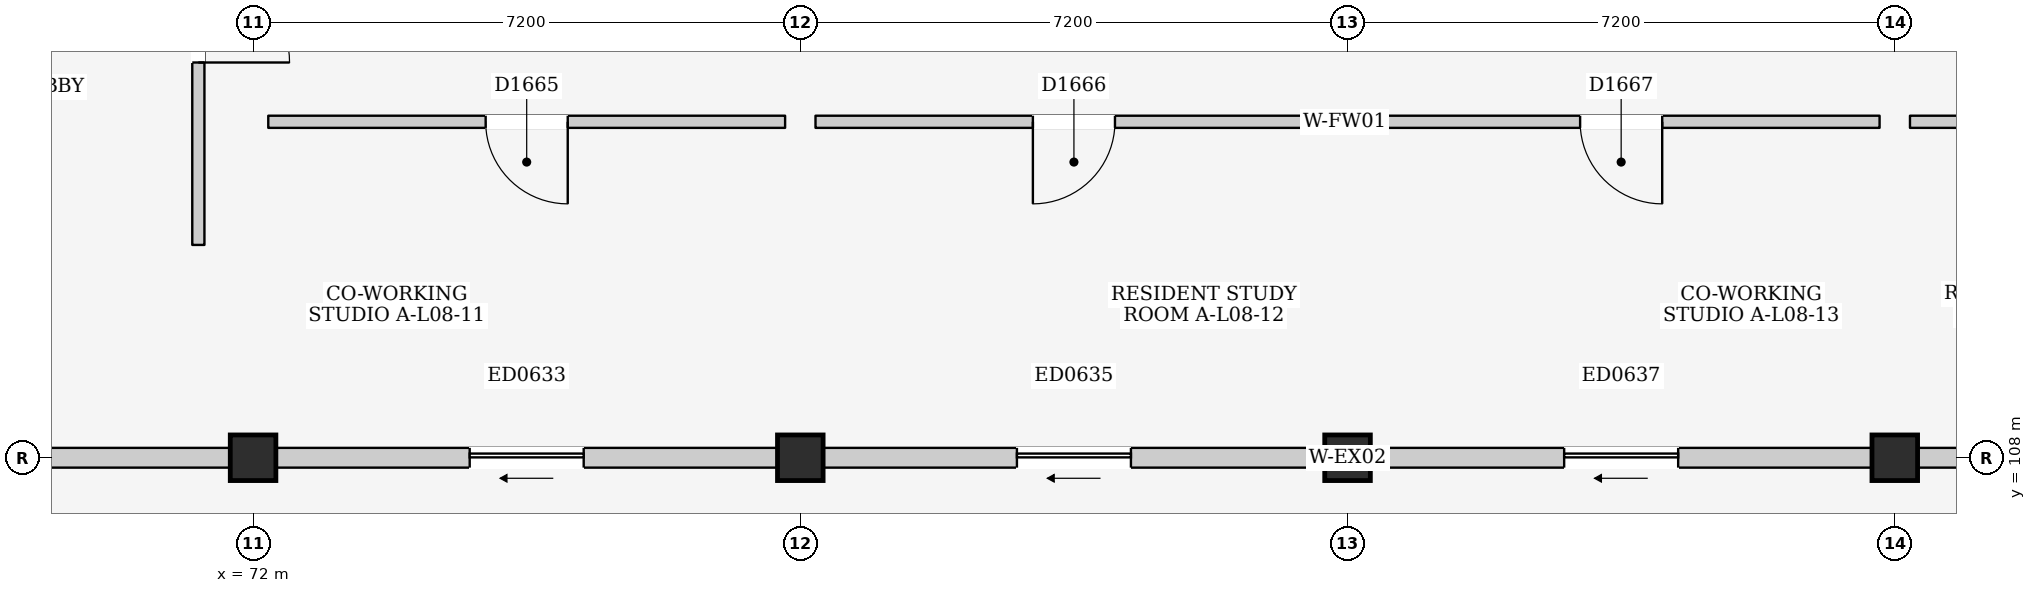
"""IFC4 building model, lengths in metres.
Left out: names, types, materials, properties, quantities, classifications, styles, units other than length and angle.
Written with IfcOpenShell. Run it as: python <this file> out.ifc"""

import sys

from ifc_helpers import new_model, si_unit, direction, frame, frame_2d, origin, origin_2d, place, context, subcontext, project, spatial, rectangle, extrude, element, fill, save


model = new_model("IFC4")
c1 = context("Model", 3, precision=1e-05, world=origin(), true_north=direction((0.0, 1.0)))
c2 = subcontext(c1, "Body", "Model", "MODEL_VIEW")
j1 = project(units=[si_unit("LENGTHUNIT", "METRE"), si_unit("PLANEANGLEUNIT", "RADIAN")], contexts=[c1])
p1 = place(None, origin())
s1 = spatial("IfcSite", under=j1, at=p1, CompositionType="ELEMENT")
p2 = place(p1, origin())
s2 = spatial("IfcBuilding", under=s1, at=p2, CompositionType="ELEMENT")
p3 = place(p2, frame((0.0, 0.0, 28.3)))
s3 = spatial("IfcBuildingStorey", under=s2, at=p3, CompositionType="ELEMENT", Elevation=28.3)
for number, where, z_axis, x_axis in (
    (1, (72.0, 108.0, 0.0), (0.0, 0.0, 1.0), (1.0, 0.0, 0.0)),
    (2, (79.2, 108.0, 0.0), (0.0, 0.0, 1.0), (1.0, 0.0, 0.0)),
    (3, (86.4, 108.0, 0.0), (0.0, 0.0, 1.0), (1.0, 0.0, 0.0)),
    (4, (93.6, 108.0, 0.0), (0.0, 0.0, 1.0), (1.0, 0.0, 0.0)),
):
    element("IfcColumn", number, at=place(p3, frame(where, z_axis=z_axis, x_axis=x_axis)), inside=s3, PredefinedType="COLUMN", context=c2, shape_type="SweptSolid", body=[
        extrude(rectangle(XDim=0.6, YDim=0.6, at=origin_2d()), origin(), (0.0, 0.0, 1.0), 3.2),
    ])
p4 = place(p3, frame((65.1, 108.0, 0.0), z_axis=(0.0, 0.0, 1.0), x_axis=(1.0, 0.0, 0.0)))
e5 = element("IfcWall", 5, at=p4, inside=s3, PredefinedType="ELEMENTEDWALL", context=c2, shape_type="SweptSolid", body=[
    extrude(rectangle(XDim=6.6, YDim=0.26, at=frame_2d((3.3, 0.0))), origin(), (0.0, 0.0, 1.0), 2.285),
])
p5 = place(p4, frame((2.8, 0.0, 1.2)))
e6 = element("IfcOpeningElement", 6, at=p5, cuts=e5, PredefinedType="OPENING", context=c2, shape_type="SweptSolid", body=[
    extrude(rectangle(XDim=1.0, YDim=0.9, at=frame_2d((0.5, 0.45))), frame((0.0, 0.145, 0.0), z_axis=(0.0, -1.0, 0.0), x_axis=(1.0, 0.0, 0.0)), (0.0, 0.0, 1.0), 0.29),
])
p6 = place(p3, frame((72.3, 108.0, 0.0), z_axis=(0.0, 0.0, 1.0), x_axis=(1.0, 0.0, 0.0)))
e7 = element("IfcWall", 7, at=p6, inside=s3, PredefinedType="ELEMENTEDWALL", context=c2, shape_type="SweptSolid", body=[
    extrude(rectangle(XDim=6.6, YDim=0.26, at=frame_2d((3.3, 0.0))), origin(), (0.0, 0.0, 1.0), 2.285),
])
p7 = place(p6, frame((2.55, 0.0, 0.0)))
e8 = element("IfcOpeningElement", 8, at=p7, cuts=e7, PredefinedType="OPENING", context=c2, shape_type="SweptSolid", body=[
    extrude(rectangle(XDim=1.5, YDim=2.12, at=frame_2d((0.75, 1.06))), frame((0.0, 0.145, 0.0), z_axis=(0.0, -1.0, 0.0), x_axis=(1.0, 0.0, 0.0)), (0.0, 0.0, 1.0), 0.29),
])
p8 = place(p3, frame((79.5, 108.0, 0.0), z_axis=(0.0, 0.0, 1.0), x_axis=(1.0, 0.0, 0.0)))
e9 = element("IfcWall", 9, at=p8, inside=s3, PredefinedType="ELEMENTEDWALL", context=c2, shape_type="SweptSolid", body=[
    extrude(rectangle(XDim=6.6, YDim=0.26, at=frame_2d((3.3, 0.0))), origin(), (0.0, 0.0, 1.0), 2.285),
])
p9 = place(p8, frame((2.55, 0.0, 0.0)))
e10 = element("IfcOpeningElement", 10, at=p9, cuts=e9, PredefinedType="OPENING", context=c2, shape_type="SweptSolid", body=[
    extrude(rectangle(XDim=1.5, YDim=2.12, at=frame_2d((0.75, 1.06))), frame((0.0, 0.145, 0.0), z_axis=(0.0, -1.0, 0.0), x_axis=(1.0, 0.0, 0.0)), (0.0, 0.0, 1.0), 0.29),
])
p10 = place(p3, frame((86.7, 108.0, 0.0), z_axis=(0.0, 0.0, 1.0), x_axis=(1.0, 0.0, 0.0)))
e11 = element("IfcWall", 11, at=p10, inside=s3, PredefinedType="ELEMENTEDWALL", context=c2, shape_type="SweptSolid", body=[
    extrude(rectangle(XDim=6.6, YDim=0.26, at=frame_2d((3.3, 0.0))), origin(), (0.0, 0.0, 1.0), 2.285),
])
p11 = place(p10, frame((2.55, 0.0, 0.0)))
e12 = element("IfcOpeningElement", 12, at=p11, cuts=e11, PredefinedType="OPENING", context=c2, shape_type="SweptSolid", body=[
    extrude(rectangle(XDim=1.5, YDim=2.12, at=frame_2d((0.75, 1.06))), frame((0.0, 0.145, 0.0), z_axis=(0.0, -1.0, 0.0), x_axis=(1.0, 0.0, 0.0)), (0.0, 0.0, 1.0), 0.29),
])
p12 = place(p3, frame((93.9, 108.0, 0.0), z_axis=(0.0, 0.0, 1.0), x_axis=(1.0, 0.0, 0.0)))
e13 = element("IfcWall", 13, at=p12, inside=s3, PredefinedType="ELEMENTEDWALL", context=c2, shape_type="SweptSolid", body=[
    extrude(rectangle(XDim=6.6, YDim=0.26, at=frame_2d((3.3, 0.0))), origin(), (0.0, 0.0, 1.0), 2.285),
])
p13 = place(p12, frame((2.55, 0.0, 0.0)))
e14 = element("IfcOpeningElement", 14, at=p13, cuts=e13, PredefinedType="OPENING", context=c2, shape_type="SweptSolid", body=[
    extrude(rectangle(XDim=1.5, YDim=2.12, at=frame_2d((0.75, 1.06))), frame((0.0, 0.145, 0.0), z_axis=(0.0, -1.0, 0.0), x_axis=(1.0, 0.0, 0.0)), (0.0, 0.0, 1.0), 0.29),
])
p14 = place(p3, frame((71.28, 110.8, 0.0), z_axis=(0.0, 0.0, 1.0), x_axis=(0.0, 1.0, 0.0)))
e15 = element("IfcWall", 15, at=p14, inside=s3, PredefinedType="PARTITIONING", context=c2, shape_type="SweptSolid", body=[
    extrude(rectangle(XDim=4.32, YDim=0.16, at=frame_2d((2.16, 0.0))), origin(), (0.0, 0.0, 1.0), 2.95),
])
p15 = place(p14, frame((2.4, 0.0, 0.0)))
e16 = element("IfcOpeningElement", 16, at=p15, cuts=e15, PredefinedType="OPENING", context=c2, shape_type="SweptSolid", body=[
    extrude(rectangle(XDim=1.2, YDim=2.2, at=frame_2d((0.6, 1.1))), frame((0.0, 0.095, 0.0), z_axis=(0.0, -1.0, 0.0), x_axis=(1.0, 0.0, 0.0)), (0.0, 0.0, 1.0), 0.19),
])
p16 = place(p3, frame((72.2, 112.42, 0.0), z_axis=(0.0, 0.0, 1.0), x_axis=(1.0, 0.0, 0.0)))
e17 = element("IfcWall", 17, at=p16, inside=s3, PredefinedType="PARTITIONING", context=c2, shape_type="SweptSolid", body=[
    extrude(rectangle(XDim=6.8, YDim=0.16, at=frame_2d((3.4, 0.0))), origin(), (0.0, 0.0, 1.0), 2.95),
])
p17 = place(p16, frame((2.86, 0.0, 0.0)))
e18 = element("IfcOpeningElement", 18, at=p17, cuts=e17, PredefinedType="OPENING", context=c2, shape_type="SweptSolid", body=[
    extrude(rectangle(XDim=1.08, YDim=2.22, at=frame_2d((0.54, 1.11))), frame((0.0, 0.095, 0.0), z_axis=(0.0, -1.0, 0.0), x_axis=(1.0, 0.0, 0.0)), (0.0, 0.0, 1.0), 0.19),
])
p18 = place(p3, frame((79.4, 112.42, 0.0), z_axis=(0.0, 0.0, 1.0), x_axis=(1.0, 0.0, 0.0)))
e19 = element("IfcWall", 19, at=p18, inside=s3, PredefinedType="PARTITIONING", context=c2, shape_type="SweptSolid", body=[
    extrude(rectangle(XDim=6.8, YDim=0.16, at=frame_2d((3.4, 0.0))), origin(), (0.0, 0.0, 1.0), 2.95),
])
p19 = place(p18, frame((2.86, 0.0, 0.0)))
e20 = element("IfcOpeningElement", 20, at=p19, cuts=e19, PredefinedType="OPENING", context=c2, shape_type="SweptSolid", body=[
    extrude(rectangle(XDim=1.08, YDim=2.22, at=frame_2d((0.54, 1.11))), frame((0.0, 0.095, 0.0), z_axis=(0.0, -1.0, 0.0), x_axis=(1.0, 0.0, 0.0)), (0.0, 0.0, 1.0), 0.19),
])
p20 = place(p3, frame((86.6, 112.42, 0.0), z_axis=(0.0, 0.0, 1.0), x_axis=(1.0, 0.0, 0.0)))
e21 = element("IfcWall", 21, at=p20, inside=s3, PredefinedType="PARTITIONING", context=c2, shape_type="SweptSolid", body=[
    extrude(rectangle(XDim=6.8, YDim=0.16, at=frame_2d((3.4, 0.0))), origin(), (0.0, 0.0, 1.0), 2.95),
])
p21 = place(p20, frame((2.86, 0.0, 0.0)))
e22 = element("IfcOpeningElement", 22, at=p21, cuts=e21, PredefinedType="OPENING", context=c2, shape_type="SweptSolid", body=[
    extrude(rectangle(XDim=1.08, YDim=2.22, at=frame_2d((0.54, 1.11))), frame((0.0, 0.095, 0.0), z_axis=(0.0, -1.0, 0.0), x_axis=(1.0, 0.0, 0.0)), (0.0, 0.0, 1.0), 0.19),
])
p22 = place(p3, frame((93.8, 112.42, 0.0), z_axis=(0.0, 0.0, 1.0), x_axis=(1.0, 0.0, 0.0)))
e23 = element("IfcWall", 23, at=p22, inside=s3, PredefinedType="PARTITIONING", context=c2, shape_type="SweptSolid", body=[
    extrude(rectangle(XDim=6.72, YDim=0.16, at=frame_2d((3.36, 0.0))), origin(), (0.0, 0.0, 1.0), 2.95),
])
p23 = place(p22, frame((2.82, 0.0, 0.0)))
e24 = element("IfcOpeningElement", 24, at=p23, cuts=e23, PredefinedType="OPENING", context=c2, shape_type="SweptSolid", body=[
    extrude(rectangle(XDim=1.08, YDim=2.22, at=frame_2d((0.54, 1.11))), frame((0.0, 0.095, 0.0), z_axis=(0.0, -1.0, 0.0), x_axis=(1.0, 0.0, 0.0)), (0.0, 0.0, 1.0), 0.19),
])
p24 = place(p7, frame((1.5, 0.0, 0.0), z_axis=(0.0, 0.0, 1.0), x_axis=(-1.0, 0.0, 0.0)))
e25 = element("IfcDoor", 25, at=p24, inside=s3, OperationType="SLIDING_TO_LEFT", PredefinedType="DOOR", context=c2, shape_type="SweptSolid", body=[
    extrude(rectangle(XDim=1.5, YDim=2.12, at=frame_2d((0.75, 1.06))), frame((0.0, 0.025, 0.0), z_axis=(0.0, -1.0, 0.0), x_axis=(1.0, 0.0, 0.0)), (0.0, 0.0, 1.0), 0.05),
])
fill(e8, e25)
p25 = place(p9, frame((1.5, 0.0, 0.0), z_axis=(0.0, 0.0, 1.0), x_axis=(-1.0, 0.0, 0.0)))
e26 = element("IfcDoor", 26, at=p25, inside=s3, OperationType="SLIDING_TO_LEFT", PredefinedType="DOOR", context=c2, shape_type="SweptSolid", body=[
    extrude(rectangle(XDim=1.5, YDim=2.12, at=frame_2d((0.75, 1.06))), frame((0.0, 0.025, 0.0), z_axis=(0.0, -1.0, 0.0), x_axis=(1.0, 0.0, 0.0)), (0.0, 0.0, 1.0), 0.05),
])
fill(e10, e26)
p26 = place(p11, frame((1.5, 0.0, 0.0), z_axis=(0.0, 0.0, 1.0), x_axis=(-1.0, 0.0, 0.0)))
e27 = element("IfcDoor", 27, at=p26, inside=s3, OperationType="SLIDING_TO_LEFT", PredefinedType="DOOR", context=c2, shape_type="SweptSolid", body=[
    extrude(rectangle(XDim=1.5, YDim=2.12, at=frame_2d((0.75, 1.06))), frame((0.0, 0.025, 0.0), z_axis=(0.0, -1.0, 0.0), x_axis=(1.0, 0.0, 0.0)), (0.0, 0.0, 1.0), 0.05),
])
fill(e12, e27)
p27 = place(p15, frame((1.2, 0.0, 0.0), z_axis=(0.0, 0.0, 1.0), x_axis=(-1.0, 0.0, 0.0)))
e28 = element("IfcDoor", 28, at=p27, inside=s3, OperationType="SINGLE_SWING_RIGHT", PredefinedType="DOOR", context=c2, shape_type="SweptSolid", body=[
    extrude(rectangle(XDim=1.2, YDim=2.2, at=frame_2d((0.6, 1.1))), frame((0.0, 0.025, 0.0), z_axis=(0.0, -1.0, 0.0), x_axis=(1.0, 0.0, 0.0)), (0.0, 0.0, 1.0), 0.05),
])
fill(e16, e28)
p28 = place(p17, frame((1.08, 0.0, 0.0), z_axis=(0.0, 0.0, 1.0), x_axis=(-1.0, 0.0, 0.0)))
e29 = element("IfcDoor", 29, at=p28, inside=s3, OperationType="SINGLE_SWING_LEFT", PredefinedType="DOOR", context=c2, shape_type="SweptSolid", body=[
    extrude(rectangle(XDim=1.08, YDim=2.22, at=frame_2d((0.54, 1.11))), frame((0.0, 0.025, 0.0), z_axis=(0.0, -1.0, 0.0), x_axis=(1.0, 0.0, 0.0)), (0.0, 0.0, 1.0), 0.05),
])
fill(e18, e29)
p29 = place(p19, frame((1.08, 0.0, 0.0), z_axis=(0.0, 0.0, 1.0), x_axis=(-1.0, 0.0, 0.0)))
e30 = element("IfcDoor", 30, at=p29, inside=s3, OperationType="SINGLE_SWING_RIGHT", PredefinedType="DOOR", context=c2, shape_type="SweptSolid", body=[
    extrude(rectangle(XDim=1.08, YDim=2.22, at=frame_2d((0.54, 1.11))), frame((0.0, 0.025, 0.0), z_axis=(0.0, -1.0, 0.0), x_axis=(1.0, 0.0, 0.0)), (0.0, 0.0, 1.0), 0.05),
])
fill(e20, e30)
p30 = place(p21, frame((1.08, 0.0, 0.0), z_axis=(0.0, 0.0, 1.0), x_axis=(-1.0, 0.0, 0.0)))
e31 = element("IfcDoor", 31, at=p30, inside=s3, OperationType="SINGLE_SWING_LEFT", PredefinedType="DOOR", context=c2, shape_type="SweptSolid", body=[
    extrude(rectangle(XDim=1.08, YDim=2.22, at=frame_2d((0.54, 1.11))), frame((0.0, 0.025, 0.0), z_axis=(0.0, -1.0, 0.0), x_axis=(1.0, 0.0, 0.0)), (0.0, 0.0, 1.0), 0.05),
])
fill(e22, e31)
save(model, sys.argv[1])
